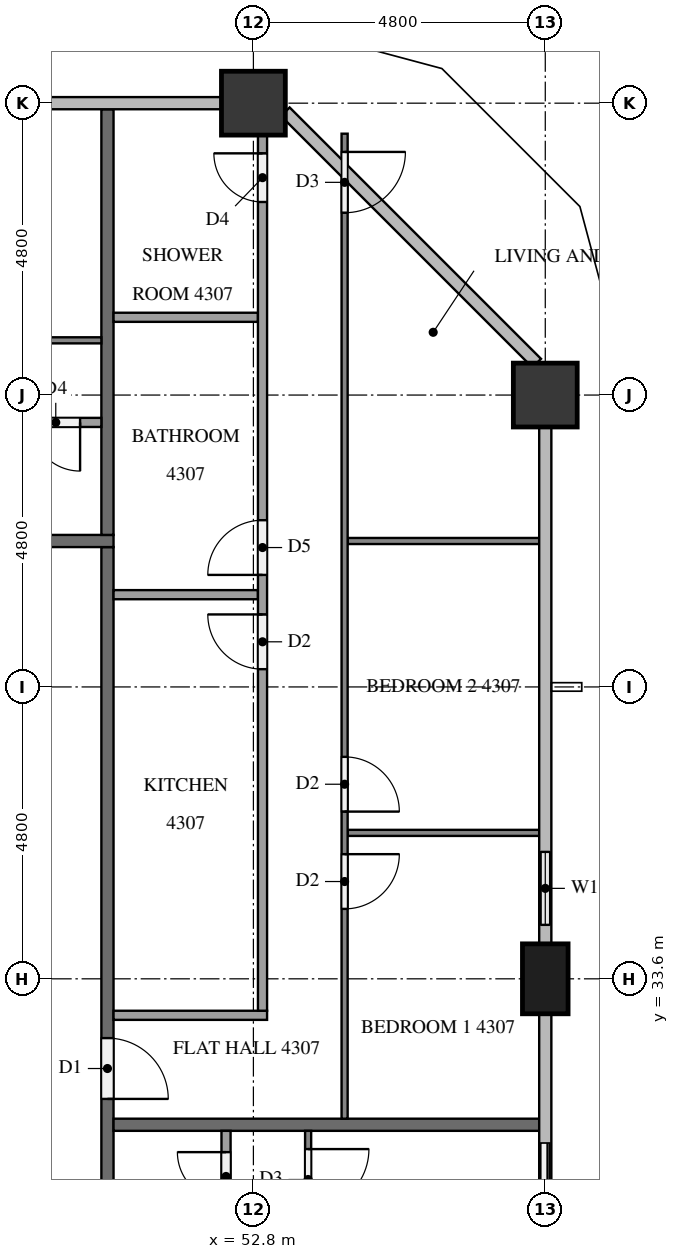
"""IFC4 building model, lengths in metres.
Left out: names, types, materials, properties, quantities, classifications, styles, units other than length and angle.
Written with IfcOpenShell. Run it as: python <this file> out.ifc"""

import sys

from ifc_helpers import new_model, si_unit, direction, frame, frame_2d, origin, origin_2d, place, context, subcontext, project, spatial, rectangle, extrude, element, fill, save


model = new_model("IFC4")
c1 = context("Model", 3, precision=1e-05, world=origin(), true_north=direction((0.0, 1.0)))
c2 = subcontext(c1, "Body", "Model", "MODEL_VIEW")
j1 = project(units=[si_unit("LENGTHUNIT", "METRE"), si_unit("PLANEANGLEUNIT", "RADIAN")], contexts=[c1])
p1 = place(None, origin())
s1 = spatial("IfcSite", under=j1, at=p1, CompositionType="ELEMENT")
p2 = place(p1, origin())
s2 = spatial("IfcBuilding", under=s1, at=p2, CompositionType="ELEMENT")
p3 = place(p2, frame((0.0, 0.0, 166.5)))
s3 = spatial("IfcBuildingStorey", under=s2, at=p3, CompositionType="ELEMENT", Elevation=166.5)
p4 = place(p3, frame((57.6, 33.6, 0.0), z_axis=(0.0, 0.0, 1.0), x_axis=(0.0, 1.0, 0.0)))
e1 = element("IfcColumn", 1, at=p4, inside=s3, PredefinedType="COLUMN", context=c2, shape_type="SweptSolid", body=[
    extrude(rectangle(XDim=1.15, YDim=0.75, at=origin_2d()), origin(), (0.0, 0.0, 1.0), 3.2),
])
for number, where, z_axis, x_axis in (
    (2, (57.6, 43.2, 0.0), (0.0, 0.0, 1.0), (1.0, 0.0, 0.0)),
    (3, (52.8, 48.0, 0.0), (0.0, 0.0, 1.0), (1.0, 0.0, 0.0)),
):
    element("IfcColumn", number, at=place(p3, frame(where, z_axis=z_axis, x_axis=x_axis)), inside=s3, PredefinedType="COLUMN", context=c2, shape_type="SweptSolid", body=[
        extrude(rectangle(XDim=1.05, YDim=1.05, at=origin_2d()), origin(), (0.0, 0.0, 1.0), 3.2),
    ])
p5 = place(p3, frame((57.6, 28.8, 0.0), z_axis=(0.0, 0.0, 1.0), x_axis=(0.0, 1.0, 0.0)))
e4 = element("IfcWall", 4, at=p5, inside=s3, PredefinedType="SOLIDWALL", context=c2, shape_type="SweptSolid", body=[
    extrude(rectangle(XDim=2.4, YDim=0.15, at=frame_2d((1.2, 0.0))), origin(), (0.0, 0.0, 1.0), 3.2),
])
p6 = place(p5, frame((0.3, 0.0, 0.0)))
e5 = element("IfcOpeningElement", 5, at=p6, cuts=e4, PredefinedType="OPENING", context=c2, shape_type="SweptSolid", body=[
    extrude(rectangle(XDim=1.8, YDim=2.4, at=frame_2d((0.9, 1.2))), frame((0.0, 0.085, 0.0), z_axis=(0.0, -1.0, 0.0), x_axis=(1.0, 0.0, 0.0)), (0.0, 0.0, 1.0), 0.17),
])
p7 = place(p3, frame((57.6, 34.175, 0.0), z_axis=(0.0, 0.0, 1.0), x_axis=(0.0, 1.0, 0.0)))
e6 = element("IfcWall", 6, at=p7, inside=s3, PredefinedType="SOLIDWALL", context=c2, shape_type="SweptSolid", body=[
    extrude(rectangle(XDim=1.825, YDim=0.15, at=frame_2d((0.913, 0.0))), origin(), (0.0, 0.0, 1.0), 3.2),
])
p8 = place(p7, frame((0.312, 0.0, 0.9)))
e7 = element("IfcOpeningElement", 7, at=p8, cuts=e6, PredefinedType="OPENING", context=c2, shape_type="SweptSolid", body=[
    extrude(rectangle(XDim=1.2, YDim=1.4, at=frame_2d((0.6, 0.7))), frame((0.0, 0.085, 0.0), z_axis=(0.0, -1.0, 0.0), x_axis=(1.0, 0.0, 0.0)), (0.0, 0.0, 1.0), 0.17),
])
p9 = place(p3, frame((50.4, 40.7, 0.0), z_axis=(0.0, 0.0, 1.0), x_axis=(0.0, -1.0, 0.0)))
e8 = element("IfcWall", 8, at=p9, inside=s3, PredefinedType="PARTITIONING", context=c2, shape_type="SweptSolid", body=[
    extrude(rectangle(XDim=28.6, YDim=0.2, at=frame_2d((14.3, 0.0))), origin(), (0.0, 0.0, 1.0), 3.2),
])
p10 = place(p9, frame((19.525, 0.0, 0.0)))
e9 = element("IfcOpeningElement", 9, at=p10, cuts=e8, PredefinedType="OPENING", context=c2, shape_type="SweptSolid", body=[
    extrude(rectangle(XDim=1.0, YDim=2.1, at=frame_2d((0.5, 1.05))), frame((0.0, 0.11, 0.0), z_axis=(0.0, -1.0, 0.0), x_axis=(1.0, 0.0, 0.0)), (0.0, 0.0, 1.0), 0.22),
])
p11 = place(p9, frame((17.675, 0.0, 0.0)))
e10 = element("IfcOpeningElement", 10, at=p11, cuts=e8, PredefinedType="OPENING", context=c2, shape_type="SweptSolid", body=[
    extrude(rectangle(XDim=1.0, YDim=2.1, at=frame_2d((0.5, 1.05))), frame((0.0, 0.11, 0.0), z_axis=(0.0, -1.0, 0.0), x_axis=(1.0, 0.0, 0.0)), (0.0, 0.0, 1.0), 0.22),
])
p12 = place(p9, frame((8.075, 0.0, 0.0)))
e11 = element("IfcOpeningElement", 11, at=p12, cuts=e8, PredefinedType="OPENING", context=c2, shape_type="SweptSolid", body=[
    extrude(rectangle(XDim=1.0, YDim=2.1, at=frame_2d((0.5, 1.05))), frame((0.0, 0.11, 0.0), z_axis=(0.0, -1.0, 0.0), x_axis=(1.0, 0.0, 0.0)), (0.0, 0.0, 1.0), 0.22),
])
p13 = place(p3, frame((11.9, 40.8, 0.0), z_axis=(0.0, 0.0, 1.0), x_axis=(1.0, 0.0, 0.0)))
e12 = element("IfcWall", 12, at=p13, inside=s3, PredefinedType="PARTITIONING", context=c2, shape_type="SweptSolid", body=[
    extrude(rectangle(XDim=38.6, YDim=0.2, at=frame_2d((19.3, 0.0))), origin(), (0.0, 0.0, 1.0), 3.2),
])
p14 = place(p13, frame((31.725, 0.0, 0.0)))
e13 = element("IfcOpeningElement", 13, at=p14, cuts=e12, PredefinedType="OPENING", context=c2, shape_type="SweptSolid", body=[
    extrude(rectangle(XDim=1.0, YDim=2.1, at=frame_2d((0.5, 1.05))), frame((0.0, 0.11, 0.0), z_axis=(0.0, -1.0, 0.0), x_axis=(1.0, 0.0, 0.0)), (0.0, 0.0, 1.0), 0.22),
])
p15 = place(p13, frame((17.325, 0.0, 0.0)))
e14 = element("IfcOpeningElement", 14, at=p15, cuts=e12, PredefinedType="OPENING", context=c2, shape_type="SweptSolid", body=[
    extrude(rectangle(XDim=1.0, YDim=2.1, at=frame_2d((0.5, 1.05))), frame((0.0, 0.11, 0.0), z_axis=(0.0, -1.0, 0.0), x_axis=(1.0, 0.0, 0.0)), (0.0, 0.0, 1.0), 0.22),
])
p16 = place(p13, frame((0.525, 0.0, 0.0)))
e15 = element("IfcOpeningElement", 15, at=p16, cuts=e12, PredefinedType="OPENING", context=c2, shape_type="SweptSolid", body=[
    extrude(rectangle(XDim=1.0, YDim=2.1, at=frame_2d((0.5, 1.05))), frame((0.0, 0.11, 0.0), z_axis=(0.0, -1.0, 0.0), x_axis=(1.0, 0.0, 0.0)), (0.0, 0.0, 1.0), 0.22),
])
for number, where, z_axis, x_axis in (
    (16, (50.5, 31.2, 0.0), (0.0, 0.0, 1.0), (1.0, 0.0, 0.0)),
    (17, (50.4, 40.9, 0.0), (0.0, 0.0, 1.0), (0.0, 1.0, 0.0)),
):
    element("IfcWall", number, at=place(p3, frame(where, z_axis=z_axis, x_axis=x_axis)), inside=s3, PredefinedType="PARTITIONING", context=c2, shape_type="SweptSolid", body=[
        extrude(rectangle(XDim=7.0, YDim=0.2, at=frame_2d((3.5, 0.0))), origin(), (0.0, 0.0, 1.0), 3.2),
    ])
p17 = place(p3, frame((53.7, 31.1, 0.0), z_axis=(0.0, 0.0, 1.0), x_axis=(0.0, -1.0, 0.0)))
e18 = element("IfcWall", 18, at=p17, inside=s3, PredefinedType="PARTITIONING", context=c2, shape_type="SweptSolid", body=[
    extrude(rectangle(XDim=9.4, YDim=0.1, at=frame_2d((4.7, 0.0))), origin(), (0.0, 0.0, 1.0), 3.2),
])
p18 = place(p17, frame((8.2, 0.0, 0.0)))
e19 = element("IfcOpeningElement", 19, at=p18, cuts=e18, PredefinedType="OPENING", context=c2, shape_type="SweptSolid", body=[
    extrude(rectangle(XDim=0.9, YDim=2.1, at=frame_2d((0.45, 1.05))), frame((0.0, 0.06, 0.0), z_axis=(0.0, -1.0, 0.0), x_axis=(1.0, 0.0, 0.0)), (0.0, 0.0, 1.0), 0.12),
])
p19 = place(p17, frame((0.3, 0.0, 0.0)))
e20 = element("IfcOpeningElement", 20, at=p19, cuts=e18, PredefinedType="OPENING", context=c2, shape_type="SweptSolid", body=[
    extrude(rectangle(XDim=1.0, YDim=2.1, at=frame_2d((0.5, 1.05))), frame((0.0, 0.06, 0.0), z_axis=(0.0, -1.0, 0.0), x_axis=(1.0, 0.0, 0.0)), (0.0, 0.0, 1.0), 0.12),
])
p20 = place(p3, frame((52.35, 23.475, 0.0), z_axis=(0.0, 0.0, 1.0), x_axis=(0.0, 1.0, 0.0)))
e21 = element("IfcWall", 21, at=p20, inside=s3, PredefinedType="PARTITIONING", context=c2, shape_type="SweptSolid", body=[
    extrude(rectangle(XDim=7.625, YDim=0.15, at=frame_2d((3.812, 0.0))), origin(), (0.0, 0.0, 1.0), 3.2),
])
p21 = place(p20, frame((0.3, 0.0, 0.0)))
e22 = element("IfcOpeningElement", 22, at=p21, cuts=e21, PredefinedType="OPENING", context=c2, shape_type="SweptSolid", body=[
    extrude(rectangle(XDim=0.9, YDim=2.1, at=frame_2d((0.45, 1.05))), frame((0.0, 0.085, 0.0), z_axis=(0.0, -1.0, 0.0), x_axis=(1.0, 0.0, 0.0)), (0.0, 0.0, 1.0), 0.17),
])
p22 = place(p20, frame((6.475, 0.0, 0.0)))
e23 = element("IfcOpeningElement", 23, at=p22, cuts=e21, PredefinedType="OPENING", context=c2, shape_type="SweptSolid", body=[
    extrude(rectangle(XDim=0.8, YDim=2.1, at=frame_2d((0.4, 1.05))), frame((0.0, 0.085, 0.0), z_axis=(0.0, -1.0, 0.0), x_axis=(1.0, 0.0, 0.0)), (0.0, 0.0, 1.0), 0.17),
])
for number, where, z_axis, x_axis in (
    (24, (54.35, 36.0, 0.0), (0.0, 0.0, 1.0), (1.0, 0.0, 0.0)),
    (25, (54.35, 40.8, 0.0), (0.0, 0.0, 1.0), (1.0, 0.0, 0.0)),
):
    element("IfcWall", number, at=place(p3, frame(where, z_axis=z_axis, x_axis=x_axis)), inside=s3, PredefinedType="PARTITIONING", context=c2, shape_type="SweptSolid", body=[
        extrude(rectangle(XDim=3.15, YDim=0.1, at=frame_2d((1.575, 0.0))), origin(), (0.0, 0.0, 1.0), 3.2),
    ])
p23 = place(p3, frame((54.3, 47.498, 0.0), z_axis=(0.0, 0.0, 1.0), x_axis=(0.0, -1.0, 0.0)))
e26 = element("IfcWall", 26, at=p23, inside=s3, PredefinedType="PARTITIONING", context=c2, shape_type="SweptSolid", body=[
    extrude(rectangle(XDim=16.198, YDim=0.1, at=frame_2d((8.099, 0.0))), origin(), (0.0, 0.0, 1.0), 3.2),
])
p24 = place(p23, frame((11.848, 0.0, 0.0)))
e27 = element("IfcOpeningElement", 27, at=p24, cuts=e26, PredefinedType="OPENING", context=c2, shape_type="SweptSolid", body=[
    extrude(rectangle(XDim=0.9, YDim=2.1, at=frame_2d((0.45, 1.05))), frame((0.0, 0.06, 0.0), z_axis=(0.0, -1.0, 0.0), x_axis=(1.0, 0.0, 0.0)), (0.0, 0.0, 1.0), 0.12),
])
p25 = place(p23, frame((10.248, 0.0, 0.0)))
e28 = element("IfcOpeningElement", 28, at=p25, cuts=e26, PredefinedType="OPENING", context=c2, shape_type="SweptSolid", body=[
    extrude(rectangle(XDim=0.9, YDim=2.1, at=frame_2d((0.45, 1.05))), frame((0.0, 0.06, 0.0), z_axis=(0.0, -1.0, 0.0), x_axis=(1.0, 0.0, 0.0)), (0.0, 0.0, 1.0), 0.12),
])
p26 = place(p23, frame((0.3, 0.0, 0.0)))
e29 = element("IfcOpeningElement", 29, at=p26, cuts=e26, PredefinedType="OPENING", context=c2, shape_type="SweptSolid", body=[
    extrude(rectangle(XDim=1.0, YDim=2.1, at=frame_2d((0.5, 1.05))), frame((0.0, 0.06, 0.0), z_axis=(0.0, -1.0, 0.0), x_axis=(1.0, 0.0, 0.0)), (0.0, 0.0, 1.0), 0.12),
])
for number, where, z_axis, x_axis in (
    (30, (50.5, 39.917, 0.0), (0.0, 0.0, 1.0), (1.0, 0.0, 0.0)),
    (31, (50.5, 44.479, 0.0), (0.0, 0.0, 1.0), (1.0, 0.0, 0.0)),
):
    element("IfcWall", number, at=place(p3, frame(where, z_axis=z_axis, x_axis=x_axis)), inside=s3, PredefinedType="PARTITIONING", context=c2, shape_type="SweptSolid", body=[
        extrude(rectangle(XDim=2.375, YDim=0.15, at=frame_2d((1.188, 0.0))), origin(), (0.0, 0.0, 1.0), 3.2),
    ])
p27 = place(p3, frame((50.5, 33.0, 0.0), z_axis=(0.0, 0.0, 1.0), x_axis=(1.0, 0.0, 0.0)))
e32 = element("IfcWall", 32, at=p27, inside=s3, PredefinedType="PARTITIONING", context=c2, shape_type="SweptSolid", body=[
    extrude(rectangle(XDim=2.525, YDim=0.15, at=frame_2d((1.262, 0.0))), origin(), (0.0, 0.0, 1.0), 3.2),
])
p28 = place(p3, frame((52.95, 33.075, 0.0), z_axis=(0.0, 0.0, 1.0), x_axis=(0.0, 1.0, 0.0)))
e33 = element("IfcWall", 33, at=p28, inside=s3, PredefinedType="PARTITIONING", context=c2, shape_type="SweptSolid", body=[
    extrude(rectangle(XDim=14.4, YDim=0.15, at=frame_2d((7.2, 0.0))), origin(), (0.0, 0.0, 1.0), 3.2),
])
p29 = place(p28, frame((5.617, 0.0, 0.0)))
e34 = element("IfcOpeningElement", 34, at=p29, cuts=e33, PredefinedType="OPENING", context=c2, shape_type="SweptSolid", body=[
    extrude(rectangle(XDim=0.9, YDim=2.1, at=frame_2d((0.45, 1.05))), frame((0.0, 0.085, 0.0), z_axis=(0.0, -1.0, 0.0), x_axis=(1.0, 0.0, 0.0)), (0.0, 0.0, 1.0), 0.17),
])
p30 = place(p28, frame((7.167, 0.0, 0.0)))
e35 = element("IfcOpeningElement", 35, at=p30, cuts=e33, PredefinedType="OPENING", context=c2, shape_type="SweptSolid", body=[
    extrude(rectangle(XDim=0.9, YDim=2.1, at=frame_2d((0.45, 1.05))), frame((0.0, 0.085, 0.0), z_axis=(0.0, -1.0, 0.0), x_axis=(1.0, 0.0, 0.0)), (0.0, 0.0, 1.0), 0.17),
])
p31 = place(p28, frame((13.3, 0.0, 0.0)))
e36 = element("IfcOpeningElement", 36, at=p31, cuts=e33, PredefinedType="OPENING", context=c2, shape_type="SweptSolid", body=[
    extrude(rectangle(XDim=0.8, YDim=2.1, at=frame_2d((0.4, 1.05))), frame((0.0, 0.085, 0.0), z_axis=(0.0, -1.0, 0.0), x_axis=(1.0, 0.0, 0.0)), (0.0, 0.0, 1.0), 0.17),
])
p32 = place(p3, frame((43.3, 44.1, 0.0), z_axis=(0.0, 0.0, 1.0), x_axis=(1.0, 0.0, 0.0)))
e37 = element("IfcWall", 37, at=p32, inside=s3, PredefinedType="PARTITIONING", context=c2, shape_type="SweptSolid", body=[
    extrude(rectangle(XDim=7.0, YDim=0.1, at=frame_2d((3.5, 0.0))), origin(), (0.0, 0.0, 1.0), 3.2),
])
p33 = place(p32, frame((0.3, 0.0, 0.0)))
e38 = element("IfcOpeningElement", 38, at=p33, cuts=e37, PredefinedType="OPENING", context=c2, shape_type="SweptSolid", body=[
    extrude(rectangle(XDim=1.0, YDim=2.1, at=frame_2d((0.5, 1.05))), frame((0.0, 0.06, 0.0), z_axis=(0.0, -1.0, 0.0), x_axis=(1.0, 0.0, 0.0)), (0.0, 0.0, 1.0), 0.12),
])
p34 = place(p3, frame((50.3, 42.75, 0.0), z_axis=(0.0, 0.0, 1.0), x_axis=(-1.0, 0.0, 0.0)))
e39 = element("IfcWall", 39, at=p34, inside=s3, PredefinedType="PARTITIONING", context=c2, shape_type="SweptSolid", body=[
    extrude(rectangle(XDim=5.225, YDim=0.15, at=frame_2d((2.613, 0.0))), origin(), (0.0, 0.0, 1.0), 3.2),
])
p35 = place(p34, frame((4.025, 0.0, 0.0)))
e40 = element("IfcOpeningElement", 40, at=p35, cuts=e39, PredefinedType="OPENING", context=c2, shape_type="SweptSolid", body=[
    extrude(rectangle(XDim=0.9, YDim=2.1, at=frame_2d((0.45, 1.05))), frame((0.0, 0.085, 0.0), z_axis=(0.0, -1.0, 0.0), x_axis=(1.0, 0.0, 0.0)), (0.0, 0.0, 1.0), 0.17),
])
p36 = place(p34, frame((0.35, 0.0, 0.0)))
e41 = element("IfcOpeningElement", 41, at=p36, cuts=e39, PredefinedType="OPENING", context=c2, shape_type="SweptSolid", body=[
    extrude(rectangle(XDim=0.8, YDim=2.1, at=frame_2d((0.4, 1.05))), frame((0.0, 0.085, 0.0), z_axis=(0.0, -1.0, 0.0), x_axis=(1.0, 0.0, 0.0)), (0.0, 0.0, 1.0), 0.17),
])
p37 = place(p6, origin())
e42 = element("IfcDoor", 42, at=p37, inside=s3, OperationType="SLIDING_TO_RIGHT", PredefinedType="DOOR", context=c2, shape_type="SweptSolid", body=[
    extrude(rectangle(XDim=1.8, YDim=2.4, at=frame_2d((0.9, 1.2))), frame((0.0, 0.025, 0.0), z_axis=(0.0, -1.0, 0.0), x_axis=(1.0, 0.0, 0.0)), (0.0, 0.0, 1.0), 0.05),
])
fill(e5, e42)
p38 = place(p8, origin())
e43 = element("IfcWindow", 43, at=p38, inside=s3, PartitioningType="SINGLE_PANEL", PredefinedType="WINDOW", context=c2, shape_type="SweptSolid", body=[
    extrude(rectangle(XDim=1.2, YDim=1.4, at=frame_2d((0.6, 0.7))), frame((0.0, 0.03, 0.0), z_axis=(0.0, -1.0, 0.0), x_axis=(1.0, 0.0, 0.0)), (0.0, 0.0, 1.0), 0.06),
])
fill(e7, e43)
p39 = place(p12, origin())
e44 = element("IfcDoor", 44, at=p39, inside=s3, OperationType="SINGLE_SWING_RIGHT", PredefinedType="DOOR", context=c2, shape_type="SweptSolid", body=[
    extrude(rectangle(XDim=1.0, YDim=2.1, at=frame_2d((0.5, 1.05))), frame((0.0, 0.025, 0.0), z_axis=(0.0, -1.0, 0.0), x_axis=(1.0, 0.0, 0.0)), (0.0, 0.0, 1.0), 0.05),
])
fill(e11, e44)
p40 = place(p19, origin())
e45 = element("IfcDoor", 45, at=p40, inside=s3, OperationType="SINGLE_SWING_LEFT", PredefinedType="DOOR", context=c2, shape_type="SweptSolid", body=[
    extrude(rectangle(XDim=1.0, YDim=2.1, at=frame_2d((0.5, 1.05))), frame((0.0, 0.025, 0.0), z_axis=(0.0, -1.0, 0.0), x_axis=(1.0, 0.0, 0.0)), (0.0, 0.0, 1.0), 0.05),
])
fill(e20, e45)
p41 = place(p22, origin())
e46 = element("IfcDoor", 46, at=p41, inside=s3, OperationType="SINGLE_SWING_RIGHT", PredefinedType="DOOR", context=c2, shape_type="SweptSolid", body=[
    extrude(rectangle(XDim=0.8, YDim=2.1, at=frame_2d((0.4, 1.05))), frame((0.0, 0.025, 0.0), z_axis=(0.0, -1.0, 0.0), x_axis=(1.0, 0.0, 0.0)), (0.0, 0.0, 1.0), 0.05),
])
fill(e23, e46)
p42 = place(p24, origin())
e47 = element("IfcDoor", 47, at=p42, inside=s3, OperationType="SINGLE_SWING_LEFT", PredefinedType="DOOR", context=c2, shape_type="SweptSolid", body=[
    extrude(rectangle(XDim=0.9, YDim=2.1, at=frame_2d((0.45, 1.05))), frame((0.0, 0.025, 0.0), z_axis=(0.0, -1.0, 0.0), x_axis=(1.0, 0.0, 0.0)), (0.0, 0.0, 1.0), 0.05),
])
fill(e27, e47)
p43 = place(p25, origin())
e48 = element("IfcDoor", 48, at=p43, inside=s3, OperationType="SINGLE_SWING_RIGHT", PredefinedType="DOOR", context=c2, shape_type="SweptSolid", body=[
    extrude(rectangle(XDim=0.9, YDim=2.1, at=frame_2d((0.45, 1.05))), frame((0.0, 0.025, 0.0), z_axis=(0.0, -1.0, 0.0), x_axis=(1.0, 0.0, 0.0)), (0.0, 0.0, 1.0), 0.05),
])
fill(e28, e48)
p44 = place(p26, origin())
e49 = element("IfcDoor", 49, at=p44, inside=s3, OperationType="SINGLE_SWING_LEFT", PredefinedType="DOOR", context=c2, shape_type="SweptSolid", body=[
    extrude(rectangle(XDim=1.0, YDim=2.1, at=frame_2d((0.5, 1.05))), frame((0.0, 0.025, 0.0), z_axis=(0.0, -1.0, 0.0), x_axis=(1.0, 0.0, 0.0)), (0.0, 0.0, 1.0), 0.05),
])
fill(e29, e49)
p45 = place(p29, origin())
e50 = element("IfcDoor", 50, at=p45, inside=s3, OperationType="SINGLE_SWING_RIGHT", PredefinedType="DOOR", context=c2, shape_type="SweptSolid", body=[
    extrude(rectangle(XDim=0.9, YDim=2.1, at=frame_2d((0.45, 1.05))), frame((0.0, 0.025, 0.0), z_axis=(0.0, -1.0, 0.0), x_axis=(1.0, 0.0, 0.0)), (0.0, 0.0, 1.0), 0.05),
])
fill(e34, e50)
p46 = place(p30, origin())
e51 = element("IfcDoor", 51, at=p46, inside=s3, OperationType="SINGLE_SWING_LEFT", PredefinedType="DOOR", context=c2, shape_type="SweptSolid", body=[
    extrude(rectangle(XDim=0.9, YDim=2.1, at=frame_2d((0.45, 1.05))), frame((0.0, 0.025, 0.0), z_axis=(0.0, -1.0, 0.0), x_axis=(1.0, 0.0, 0.0)), (0.0, 0.0, 1.0), 0.05),
])
fill(e35, e51)
p47 = place(p31, origin())
e52 = element("IfcDoor", 52, at=p47, inside=s3, OperationType="SINGLE_SWING_RIGHT", PredefinedType="DOOR", context=c2, shape_type="SweptSolid", body=[
    extrude(rectangle(XDim=0.8, YDim=2.1, at=frame_2d((0.4, 1.05))), frame((0.0, 0.025, 0.0), z_axis=(0.0, -1.0, 0.0), x_axis=(1.0, 0.0, 0.0)), (0.0, 0.0, 1.0), 0.05),
])
fill(e36, e52)
p48 = place(p36, origin())
e53 = element("IfcDoor", 53, at=p48, inside=s3, OperationType="SINGLE_SWING_LEFT", PredefinedType="DOOR", context=c2, shape_type="SweptSolid", body=[
    extrude(rectangle(XDim=0.8, YDim=2.1, at=frame_2d((0.4, 1.05))), frame((0.0, 0.025, 0.0), z_axis=(0.0, -1.0, 0.0), x_axis=(1.0, 0.0, 0.0)), (0.0, 0.0, 1.0), 0.05),
])
fill(e41, e53)
save(model, sys.argv[1])
